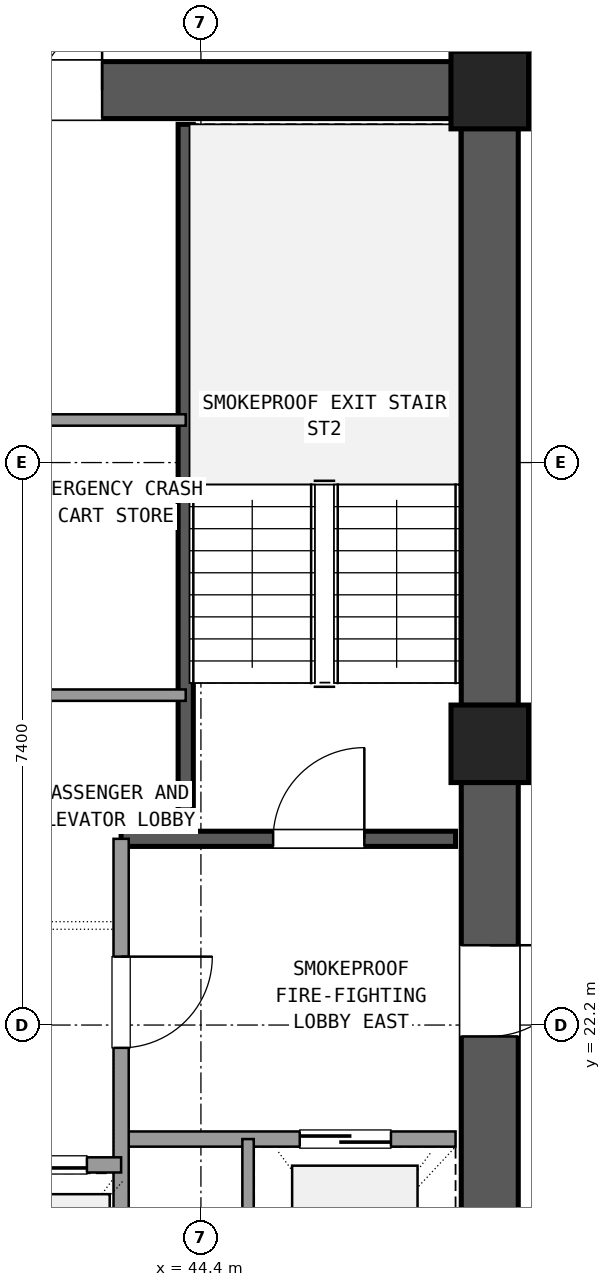
"""IFC4 building model, lengths in metres.
Left out: names, types, materials, properties, quantities, classifications, styles, units other than length and angle.
Written with IfcOpenShell. Run it as: python <this file> out.ifc"""

import sys

from ifc_helpers import new_model, si_unit, direction, frame, frame_2d, origin, origin_2d, place, context, subcontext, project, spatial, rectangle, extrude, element, fill, save


model = new_model("IFC4")
c1 = context("Model", 3, precision=1e-05, world=origin(), true_north=direction((0.0, 1.0)))
c2 = subcontext(c1, "Body", "Model", "MODEL_VIEW")
j1 = project(units=[si_unit("LENGTHUNIT", "METRE"), si_unit("PLANEANGLEUNIT", "RADIAN")], contexts=[c1])
p1 = place(None, origin())
s1 = spatial("IfcSite", under=j1, at=p1, CompositionType="ELEMENT")
p2 = place(p1, origin())
s2 = spatial("IfcBuilding", under=s1, at=p2, CompositionType="ELEMENT")
p3 = place(p2, frame((0.0, 0.0, 95.58)))
s3 = spatial("IfcBuildingStorey", under=s2, at=p3, CompositionType="ELEMENT", Elevation=95.58)
for number, where, z_axis, x_axis in (
    (1, (48.2, 25.9, 0.0), (0.0, 0.0, 1.0), (1.0, 0.0, 0.0)),
    (2, (48.2, 34.5, 0.0), (0.0, 0.0, 1.0), (1.0, 0.0, 0.0)),
):
    element("IfcColumn", number, at=place(p3, frame(where, z_axis=z_axis, x_axis=x_axis)), inside=s3, PredefinedType="COLUMN", context=c2, shape_type="SweptSolid", body=[
        extrude(rectangle(XDim=1.02, YDim=1.02, at=origin_2d()), origin(), (0.0, 0.0, 1.0), 3.6),
    ])
p4 = place(p3, frame((48.2, 17.805, 0.0), z_axis=(0.0, 0.0, 1.0), x_axis=(0.0, 1.0, 0.0)))
e3 = element("IfcWall", 3, at=p4, inside=s3, PredefinedType="SHEAR", context=c2, shape_type="SweptSolid", body=[
    extrude(rectangle(XDim=7.59, YDim=0.75, at=frame_2d((3.795, 0.0))), origin(), (0.0, 0.0, 1.0), 3.32),
])
p5 = place(p4, frame((4.245, 0.0, 0.0)))
e4 = element("IfcOpeningElement", 4, at=p5, cuts=e3, PredefinedType="OPENING", context=c2, shape_type="SweptSolid", body=[
    extrude(rectangle(XDim=1.2, YDim=2.15, at=frame_2d((0.6, 1.075))), frame((0.0, 0.385, 0.0), z_axis=(0.0, -1.0, 0.0), x_axis=(1.0, 0.0, 0.0)), (0.0, 0.0, 1.0), 0.77),
])
p6 = place(p3, frame((48.2, 26.405, 0.0), z_axis=(0.0, 0.0, 1.0), x_axis=(0.0, 1.0, 0.0)))
e5 = element("IfcWall", 5, at=p6, inside=s3, PredefinedType="SHEAR", context=c2, shape_type="SweptSolid", body=[
    extrude(rectangle(XDim=7.59, YDim=0.75, at=frame_2d((3.795, 0.0))), origin(), (0.0, 0.0, 1.0), 3.32),
])
p7 = place(p3, frame((47.695, 34.5, 0.0), z_axis=(0.0, 0.0, 1.0), x_axis=(-1.0, 0.0, 0.0)))
e6 = element("IfcWall", 6, at=p7, inside=s3, PredefinedType="SHEAR", context=c2, shape_type="SweptSolid", body=[
    extrude(rectangle(XDim=10.19, YDim=0.75, at=frame_2d((5.095, 0.0))), origin(), (0.0, 0.0, 1.0), 3.32),
])
p8 = place(p7, frame((4.595, 0.0, 0.0)))
e7 = element("IfcOpeningElement", 7, at=p8, cuts=e6, PredefinedType="OPENING", context=c2, shape_type="SweptSolid", body=[
    extrude(rectangle(XDim=1.6, YDim=2.2, at=frame_2d((0.8, 1.1))), frame((0.0, 0.385, 0.0), z_axis=(0.0, -1.0, 0.0), x_axis=(1.0, 0.0, 0.0)), (0.0, 0.0, 1.0), 0.77),
])
p9 = place(p3, frame((44.2, 24.65, 0.0), z_axis=(0.0, 0.0, 1.0), x_axis=(0.0, 1.0, 0.0)))
e8 = element("IfcWall", 8, at=p9, inside=s3, PredefinedType="SHEAR", context=c2, shape_type="SweptSolid", body=[
    extrude(rectangle(XDim=9.4, YDim=0.2, at=frame_2d((4.7, 0.0))), origin(), (0.0, 0.0, 1.0), 3.32),
])
p10 = place(p3, frame((43.35, 24.65, 0.0), z_axis=(0.0, 0.0, 1.0), x_axis=(1.0, 0.0, 0.0)))
e9 = element("IfcWall", 9, at=p10, inside=s3, PredefinedType="SHEAR", context=c2, shape_type="SweptSolid", body=[
    extrude(rectangle(XDim=4.4, YDim=0.2, at=frame_2d((2.2, 0.0))), origin(), (0.0, 0.0, 1.0), 3.32),
])
p11 = place(p10, frame((2.0, 0.0, 0.0)))
e10 = element("IfcOpeningElement", 10, at=p11, cuts=e9, PredefinedType="OPENING", context=c2, shape_type="SweptSolid", body=[
    extrude(rectangle(XDim=1.2, YDim=2.15, at=frame_2d((0.6, 1.075))), frame((0.0, 0.11, 0.0), z_axis=(0.0, -1.0, 0.0), x_axis=(1.0, 0.0, 0.0)), (0.0, 0.0, 1.0), 0.22),
])
p12 = place(p3, frame((43.35, 20.7, 0.0), z_axis=(0.0, 0.0, 1.0), x_axis=(1.0, 0.0, 0.0)))
e11 = element("IfcWall", 11, at=p12, inside=s3, PredefinedType="SOLIDWALL", context=c2, shape_type="SweptSolid", body=[
    extrude(rectangle(XDim=4.4, YDim=0.2, at=frame_2d((2.2, 0.0))), origin(), (0.0, 0.0, 1.0), 2.61),
])
p13 = place(p12, frame((2.35, 0.0, 0.0)))
e12 = element("IfcOpeningElement", 12, at=p13, cuts=e11, PredefinedType="OPENING", context=c2, shape_type="SweptSolid", body=[
    extrude(rectangle(XDim=1.2, YDim=2.15, at=frame_2d((0.6, 1.075))), frame((0.0, 0.11, 0.0), z_axis=(0.0, -1.0, 0.0), x_axis=(1.0, 0.0, 0.0)), (0.0, 0.0, 1.0), 0.22),
])
p14 = place(p3, frame((43.35, 17.75, 0.0), z_axis=(0.0, 0.0, 1.0), x_axis=(0.0, 1.0, 0.0)))
e13 = element("IfcWall", 13, at=p14, inside=s3, PredefinedType="SOLIDWALL", context=c2, shape_type="SweptSolid", body=[
    extrude(rectangle(XDim=6.9, YDim=0.2, at=frame_2d((3.45, 0.0))), origin(), (0.0, 0.0, 1.0), 2.61),
])
p15 = place(p14, frame((4.15, 0.0, 0.0)))
e14 = element("IfcOpeningElement", 14, at=p15, cuts=e13, PredefinedType="OPENING", context=c2, shape_type="SweptSolid", body=[
    extrude(rectangle(XDim=1.2, YDim=2.15, at=frame_2d((0.6, 1.075))), frame((0.0, 0.11, 0.0), z_axis=(0.0, -1.0, 0.0), x_axis=(1.0, 0.0, 0.0)), (0.0, 0.0, 1.0), 0.22),
])
p16 = place(p3, frame((45.02, 17.75, 0.0), z_axis=(0.0, 0.0, 1.0), x_axis=(0.0, 1.0, 0.0)))
e15 = element("IfcWall", 15, at=p16, inside=s3, PredefinedType="PARTITIONING", context=c2, shape_type="SweptSolid", body=[
    extrude(rectangle(XDim=2.95, YDim=0.15, at=frame_2d((1.475, 0.0))), origin(), (0.0, 0.0, 1.0), 2.61),
])
p17 = place(p3, frame((37.25, 20.36, 0.0), z_axis=(0.0, 0.0, 1.0), x_axis=(1.0, 0.0, 0.0)))
e16 = element("IfcWall", 16, at=p17, inside=s3, PredefinedType="SOLIDWALL", context=c2, shape_type="SweptSolid", body=[
    extrude(rectangle(XDim=6.1, YDim=0.2, at=frame_2d((3.05, 0.0))), origin(), (0.0, 0.0, 1.0), 2.61),
])
p18 = place(p17, frame((0.45, 0.0, 0.0)))
e17 = element("IfcOpeningElement", 17, at=p18, cuts=e16, PredefinedType="OPENING", context=c2, shape_type="SweptSolid", body=[
    extrude(rectangle(XDim=1.1, YDim=2.15, at=frame_2d((0.55, 1.075))), frame((0.0, 0.11, 0.0), z_axis=(0.0, -1.0, 0.0), x_axis=(1.0, 0.0, 0.0)), (0.0, 0.0, 1.0), 0.22),
])
p19 = place(p17, frame((2.5, 0.0, 0.0)))
e18 = element("IfcOpeningElement", 18, at=p19, cuts=e16, PredefinedType="OPENING", context=c2, shape_type="SweptSolid", body=[
    extrude(rectangle(XDim=1.1, YDim=2.15, at=frame_2d((0.55, 1.075))), frame((0.0, 0.11, 0.0), z_axis=(0.0, -1.0, 0.0), x_axis=(1.0, 0.0, 0.0)), (0.0, 0.0, 1.0), 0.22),
])
p20 = place(p17, frame((4.55, 0.0, 0.0)))
e19 = element("IfcOpeningElement", 19, at=p20, cuts=e16, PredefinedType="OPENING", context=c2, shape_type="SweptSolid", body=[
    extrude(rectangle(XDim=1.1, YDim=2.15, at=frame_2d((0.55, 1.075))), frame((0.0, 0.11, 0.0), z_axis=(0.0, -1.0, 0.0), x_axis=(1.0, 0.0, 0.0)), (0.0, 0.0, 1.0), 0.22),
])
for number, where, z_axis, x_axis in (
    (20, (42.27, 26.54, 0.0), (0.0, 0.0, 1.0), (1.0, 0.0, 0.0)),
    (21, (42.27, 30.16, 0.0), (0.0, 0.0, 1.0), (1.0, 0.0, 0.0)),
):
    element("IfcWall", number, at=place(p3, frame(where, z_axis=z_axis, x_axis=x_axis)), inside=s3, PredefinedType="PARTITIONING", context=c2, shape_type="SweptSolid", body=[
        extrude(rectangle(XDim=1.93, YDim=0.15, at=frame_2d((0.965, 0.0))), origin(), (0.0, 0.0, 1.0), 2.61),
    ])
p21 = place(p11, origin())
e22 = element("IfcDoor", 22, at=p21, inside=s3, OperationType="SINGLE_SWING_RIGHT", PredefinedType="DOOR", context=c2, shape_type="SweptSolid", body=[
    extrude(rectangle(XDim=1.2, YDim=2.15, at=frame_2d((0.6, 1.075))), frame((0.0, 0.025, 0.0), z_axis=(0.0, -1.0, 0.0), x_axis=(1.0, 0.0, 0.0)), (0.0, 0.0, 1.0), 0.05),
])
fill(e10, e22)
p22 = place(p13, origin())
e23 = element("IfcDoor", 23, at=p22, inside=s3, OperationType="SLIDING_TO_RIGHT", PredefinedType="DOOR", context=c2, shape_type="SweptSolid", body=[
    extrude(rectangle(XDim=1.2, YDim=2.15, at=frame_2d((0.6, 1.075))), frame((0.0, 0.025, 0.0), z_axis=(0.0, -1.0, 0.0), x_axis=(1.0, 0.0, 0.0)), (0.0, 0.0, 1.0), 0.05),
])
fill(e12, e23)
p23 = place(p15, frame((1.2, 0.0, 0.0), z_axis=(0.0, 0.0, 1.0), x_axis=(-1.0, 0.0, 0.0)))
e24 = element("IfcDoor", 24, at=p23, inside=s3, OperationType="SINGLE_SWING_RIGHT", PredefinedType="DOOR", context=c2, shape_type="SweptSolid", body=[
    extrude(rectangle(XDim=1.2, YDim=2.15, at=frame_2d((0.6, 1.075))), frame((0.0, 0.025, 0.0), z_axis=(0.0, -1.0, 0.0), x_axis=(1.0, 0.0, 0.0)), (0.0, 0.0, 1.0), 0.05),
])
fill(e14, e24)
p24 = place(p5, frame((1.2, 0.0, 0.0), z_axis=(0.0, 0.0, 1.0), x_axis=(-1.0, 0.0, 0.0)))
e25 = element("IfcDoor", 25, at=p24, inside=s3, OperationType="SINGLE_SWING_RIGHT", PredefinedType="DOOR", context=c2, shape_type="SweptSolid", body=[
    extrude(rectangle(XDim=1.2, YDim=2.15, at=frame_2d((0.6, 1.075))), frame((0.0, 0.025, 0.0), z_axis=(0.0, -1.0, 0.0), x_axis=(1.0, 0.0, 0.0)), (0.0, 0.0, 1.0), 0.05),
])
fill(e4, e25)
p25 = place(p8, frame((1.6, 0.0, 0.0), z_axis=(0.0, 0.0, 1.0), x_axis=(-1.0, 0.0, 0.0)))
e26 = element("IfcDoor", 26, at=p25, inside=s3, OperationType="DOUBLE_DOOR_SINGLE_SWING", PredefinedType="DOOR", context=c2, shape_type="SweptSolid", body=[
    extrude(rectangle(XDim=1.6, YDim=2.2, at=frame_2d((0.8, 1.1))), frame((0.0, 0.025, 0.0), z_axis=(0.0, -1.0, 0.0), x_axis=(1.0, 0.0, 0.0)), (0.0, 0.0, 1.0), 0.05),
])
fill(e7, e26)
p26 = place(p20, origin())
e27 = element("IfcDoor", 27, at=p26, inside=s3, OperationType="SLIDING_TO_LEFT", PredefinedType="DOOR", context=c2, shape_type="SweptSolid", body=[
    extrude(rectangle(XDim=1.1, YDim=2.15, at=frame_2d((0.55, 1.075))), frame((0.0, 0.025, 0.0), z_axis=(0.0, -1.0, 0.0), x_axis=(1.0, 0.0, 0.0)), (0.0, 0.0, 1.0), 0.05),
])
fill(e19, e27)
save(model, sys.argv[1])
